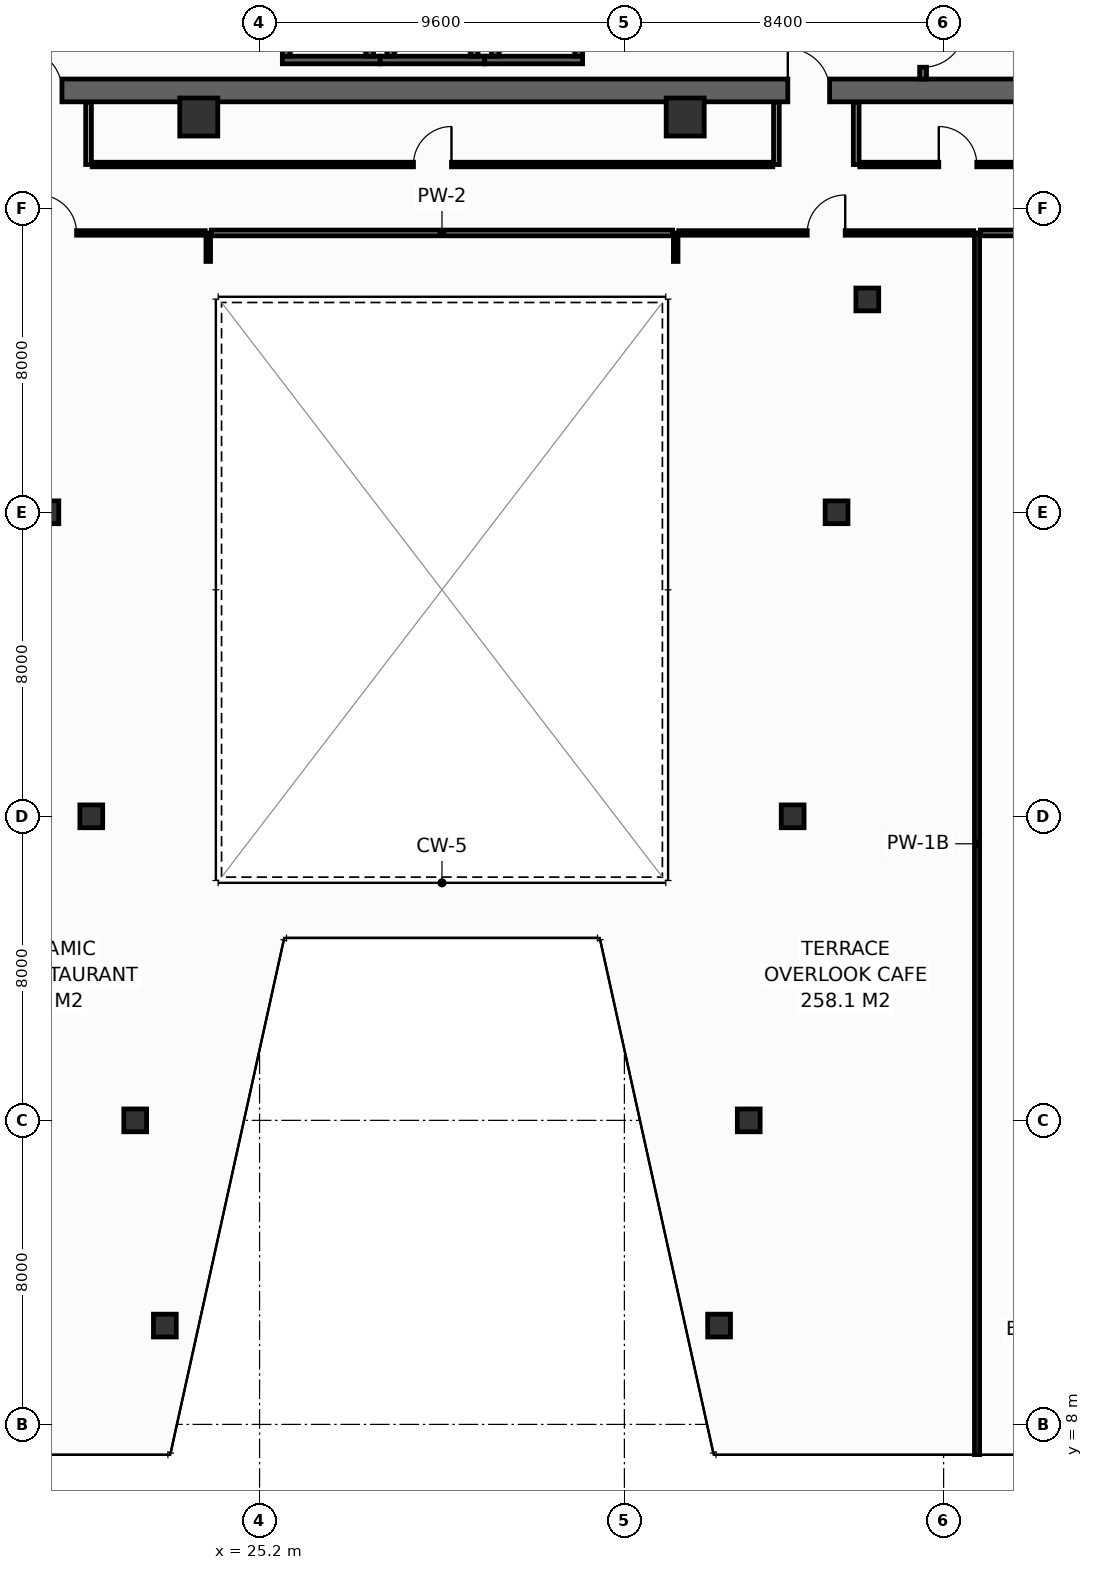
"""IFC4 building model, lengths in metres.
Left out: names, types, materials, properties, quantities, classifications, styles, units other than length and angle.
Written with IfcOpenShell. Run it as: python <this file> out.ifc"""

import sys

from ifc_helpers import new_model, si_unit, direction, frame, frame_2d, origin, origin_2d, place, context, subcontext, project, spatial, rectangle, hollow_rectangle, extrude, element, fill, save


model = new_model("IFC4")
c1 = context("Model", 3, precision=1e-05, world=origin(), true_north=direction((0.0, 1.0)))
c2 = subcontext(c1, "Body", "Model", "MODEL_VIEW")
j1 = project(units=[si_unit("LENGTHUNIT", "METRE"), si_unit("PLANEANGLEUNIT", "RADIAN")], contexts=[c1])
p1 = place(None, origin())
s1 = spatial("IfcSite", under=j1, at=p1, CompositionType="ELEMENT")
p2 = place(p1, origin())
s2 = spatial("IfcBuilding", under=s1, at=p2, CompositionType="ELEMENT")
p3 = place(p2, frame((0.0, 0.0, 106.0)))
s3 = spatial("IfcBuildingStorey", under=s2, at=p3, CompositionType="ELEMENT", Elevation=106.0)
p4 = place(p3, frame((13.5, 43.1, 0.0), z_axis=(0.0, 0.0, 1.0), x_axis=(1.0, 0.0, 0.0)))
e1 = element("IfcWall", 1, at=p4, inside=s3, PredefinedType="SHEAR", context=c2, shape_type="SweptSolid", body=[
    extrude(rectangle(XDim=32.9, YDim=0.6, at=frame_2d((16.45, 0.0))), origin(), (0.0, 0.0, 1.0), 4.15),
])
p5 = place(p4, frame((5.4, 0.0, 0.0)))
e2 = element("IfcOpeningElement", 2, at=p5, cuts=e1, PredefinedType="OPENING", context=c2, shape_type="SweptSolid", body=[
    extrude(rectangle(XDim=1.1, YDim=2.15, at=frame_2d((0.55, 1.075))), frame((0.0, 0.31, 0.0), z_axis=(0.0, -1.0, 0.0), x_axis=(1.0, 0.0, 0.0)), (0.0, 0.0, 1.0), 0.62),
])
p6 = place(p4, frame((25.6, 0.0, 0.0)))
e3 = element("IfcOpeningElement", 3, at=p6, cuts=e1, PredefinedType="OPENING", context=c2, shape_type="SweptSolid", body=[
    extrude(rectangle(XDim=1.1, YDim=2.15, at=frame_2d((0.55, 1.075))), frame((0.0, 0.31, 0.0), z_axis=(0.0, -1.0, 0.0), x_axis=(1.0, 0.0, 0.0)), (0.0, 0.0, 1.0), 0.62),
])
for number, where, z_axis, x_axis in (
    (4, (23.6, 42.4, 0.0), (0.0, 0.0, 1.0), (1.0, 0.0, 0.0)),
    (5, (36.4, 42.4, 0.0), (0.0, 0.0, 1.0), (1.0, 0.0, 0.0)),
):
    element("IfcColumn", number, at=place(p3, frame(where, z_axis=z_axis, x_axis=x_axis)), inside=s3, PredefinedType="COLUMN", context=c2, shape_type="SweptSolid", body=[
        extrude(hollow_rectangle(XDim=1.0, YDim=1.0, WallThickness=0.045, at=origin_2d()), origin(), (0.0, 0.0, 1.0), 4.4),
    ])
for number, where, z_axis, x_axis in (
    (6, (22.708, 10.6, 0.0), (0.0, 0.0, 1.0), (1.0, 0.0, 0.0)),
    (7, (37.292, 10.6, 0.0), (0.0, 0.0, 1.0), (1.0, 0.0, 0.0)),
    (8, (21.928, 16.0, 0.0), (0.0, 0.0, 1.0), (1.0, 0.0, 0.0)),
    (9, (38.072, 16.0, 0.0), (0.0, 0.0, 1.0), (1.0, 0.0, 0.0)),
    (10, (20.772, 24.0, 0.0), (0.0, 0.0, 1.0), (1.0, 0.0, 0.0)),
    (11, (39.228, 24.0, 0.0), (0.0, 0.0, 1.0), (1.0, 0.0, 0.0)),
    (12, (19.617, 32.0, 0.0), (0.0, 0.0, 1.0), (1.0, 0.0, 0.0)),
    (13, (40.383, 32.0, 0.0), (0.0, 0.0, 1.0), (1.0, 0.0, 0.0)),
    (14, (41.192, 37.6, 0.0), (0.0, 0.0, 1.0), (1.0, 0.0, 0.0)),
):
    element("IfcColumn", number, at=place(p3, frame(where, z_axis=z_axis, x_axis=x_axis)), inside=s3, PredefinedType="COLUMN", context=c2, shape_type="SweptSolid", body=[
        extrude(hollow_rectangle(XDim=0.6, YDim=0.6, WallThickness=0.028, at=origin_2d()), origin(), (0.0, 0.0, 1.0), 4.4),
    ])
p7 = place(p3, frame((25.8, 43.9, 0.0), z_axis=(0.0, 0.0, 1.0), x_axis=(1.0, 0.0, 0.0)))
e15 = element("IfcWall", 15, at=p7, inside=s3, PredefinedType="SHEAR", context=c2, shape_type="SweptSolid", body=[
    extrude(rectangle(XDim=2.575, YDim=0.2, at=frame_2d((1.288, 0.0))), origin(), (0.0, 0.0, 1.0), 4.15),
])
for number, where, z_axis, x_axis in (
    (16, (25.9, 44.0, 0.0), (0.0, 0.0, 1.0), (0.0, 1.0, 0.0)),
    (17, (28.1, 44.0, 0.0), (0.0, 0.0, 1.0), (0.0, 1.0, 0.0)),
):
    element("IfcWall", number, at=place(p3, frame(where, z_axis=z_axis, x_axis=x_axis)), inside=s3, PredefinedType="SHEAR", context=c2, shape_type="SweptSolid", body=[
        extrude(rectangle(XDim=2.3, YDim=0.2, at=frame_2d((1.15, 0.0))), origin(), (0.0, 0.0, 1.0), 4.15),
    ])
p8 = place(p3, frame((28.375, 43.9, 0.0), z_axis=(0.0, 0.0, 1.0), x_axis=(1.0, 0.0, 0.0)))
e18 = element("IfcWall", 18, at=p8, inside=s3, PredefinedType="SHEAR", context=c2, shape_type="SweptSolid", body=[
    extrude(rectangle(XDim=2.75, YDim=0.2, at=frame_2d((1.375, 0.0))), origin(), (0.0, 0.0, 1.0), 4.15),
])
for number, where, z_axis, x_axis in (
    (19, (28.65, 44.0, 0.0), (0.0, 0.0, 1.0), (0.0, 1.0, 0.0)),
    (20, (30.85, 44.0, 0.0), (0.0, 0.0, 1.0), (0.0, 1.0, 0.0)),
):
    element("IfcWall", number, at=place(p3, frame(where, z_axis=z_axis, x_axis=x_axis)), inside=s3, PredefinedType="SHEAR", context=c2, shape_type="SweptSolid", body=[
        extrude(rectangle(XDim=2.3, YDim=0.2, at=frame_2d((1.15, 0.0))), origin(), (0.0, 0.0, 1.0), 4.15),
    ])
p9 = place(p3, frame((31.125, 43.9, 0.0), z_axis=(0.0, 0.0, 1.0), x_axis=(1.0, 0.0, 0.0)))
e21 = element("IfcWall", 21, at=p9, inside=s3, PredefinedType="SHEAR", context=c2, shape_type="SweptSolid", body=[
    extrude(rectangle(XDim=2.575, YDim=0.2, at=frame_2d((1.288, 0.0))), origin(), (0.0, 0.0, 1.0), 4.15),
])
for number, where, z_axis, x_axis in (
    (22, (31.4, 44.0, 0.0), (0.0, 0.0, 1.0), (0.0, 1.0, 0.0)),
    (23, (33.6, 44.0, 0.0), (0.0, 0.0, 1.0), (0.0, 1.0, 0.0)),
):
    element("IfcWall", number, at=place(p3, frame(where, z_axis=z_axis, x_axis=x_axis)), inside=s3, PredefinedType="SHEAR", context=c2, shape_type="SweptSolid", body=[
        extrude(rectangle(XDim=2.3, YDim=0.2, at=frame_2d((1.15, 0.0))), origin(), (0.0, 0.0, 1.0), 4.15),
    ])
p10 = place(p3, frame((42.66, 53.8, 0.0), z_axis=(0.0, 0.0, 1.0), x_axis=(0.0, -1.0, 0.0)))
e24 = element("IfcWall", 24, at=p10, inside=s3, PredefinedType="SHEAR", context=c2, shape_type="SweptSolid", body=[
    extrude(rectangle(XDim=10.4, YDim=0.18, at=frame_2d((5.2, 0.0))), origin(), (0.0, 0.0, 1.0), 4.15),
])
p11 = place(p10, frame((8.99, 0.0, 0.0)))
e25 = element("IfcOpeningElement", 25, at=p11, cuts=e24, PredefinedType="OPENING", context=c2, shape_type="SweptSolid", body=[
    extrude(rectangle(XDim=1.1, YDim=2.15, at=frame_2d((0.55, 1.075))), frame((0.0, 0.1, 0.0), z_axis=(0.0, -1.0, 0.0), x_axis=(1.0, 0.0, 0.0)), (0.0, 0.0, 1.0), 0.2),
])
for number, where, z_axis, x_axis in (
    (26, (20.7, 41.15, 0.0), (0.0, 0.0, 1.0), (0.0, 1.0, 0.0)),
    (27, (38.8, 41.15, 0.0), (0.0, 0.0, 1.0), (0.0, 1.0, 0.0)),
    (28, (40.9, 41.15, 0.0), (0.0, 0.0, 1.0), (0.0, 1.0, 0.0)),
):
    element("IfcWall", number, at=place(p3, frame(where, z_axis=z_axis, x_axis=x_axis)), inside=s3, PredefinedType="PARTITIONING", context=c2, shape_type="SweptSolid", body=[
        extrude(rectangle(XDim=1.63, YDim=0.15, at=frame_2d((0.815, 0.0))), origin(), (0.0, 0.0, 1.0), 4.15),
    ])
p12 = place(p3, frame((20.795, 41.15, 0.0), z_axis=(0.0, 0.0, 1.0), x_axis=(1.0, 0.0, 0.0)))
e29 = element("IfcWall", 29, at=p12, inside=s3, PredefinedType="PARTITIONING", context=c2, shape_type="SweptSolid", body=[
    extrude(rectangle(XDim=17.91, YDim=0.12, at=frame_2d((8.955, 0.0))), origin(), (0.0, 0.0, 1.0), 3.335),
])
p13 = place(p12, frame((8.455, 0.0, 0.0)))
e30 = element("IfcOpeningElement", 30, at=p13, cuts=e29, PredefinedType="OPENING", context=c2, shape_type="SweptSolid", body=[
    extrude(rectangle(XDim=1.0, YDim=2.15, at=frame_2d((0.5, 1.075))), frame((0.0, 0.07, 0.0), z_axis=(0.0, -1.0, 0.0), x_axis=(1.0, 0.0, 0.0)), (0.0, 0.0, 1.0), 0.14),
])
p14 = place(p3, frame((40.995, 41.15, 0.0), z_axis=(0.0, 0.0, 1.0), x_axis=(1.0, 0.0, 0.0)))
e31 = element("IfcWall", 31, at=p14, inside=s3, PredefinedType="PARTITIONING", context=c2, shape_type="SweptSolid", body=[
    extrude(rectangle(XDim=5.155, YDim=0.12, at=frame_2d((2.577, 0.0))), origin(), (0.0, 0.0, 1.0), 4.15),
])
p15 = place(p14, frame((2.078, 0.0, 0.0)))
e32 = element("IfcOpeningElement", 32, at=p15, cuts=e31, PredefinedType="OPENING", context=c2, shape_type="SweptSolid", body=[
    extrude(rectangle(XDim=1.0, YDim=2.15, at=frame_2d((0.5, 1.075))), frame((0.0, 0.07, 0.0), z_axis=(0.0, -1.0, 0.0), x_axis=(1.0, 0.0, 0.0)), (0.0, 0.0, 1.0), 0.14),
])
p16 = place(p3, frame((44.08, 7.205, 0.0), z_axis=(0.0, 0.0, 1.0), x_axis=(0.0, 1.0, 0.0)))
e33 = element("IfcWall", 33, at=p16, inside=s3, PredefinedType="PARTITIONING", context=c2, shape_type="SweptSolid", body=[
    extrude(rectangle(XDim=32.145, YDim=0.135, at=frame_2d((16.073, 0.0))), origin(), (0.0, 0.0, 1.0), 3.335),
])
for number, where, z_axis, x_axis in (
    (34, (23.85, 38.6, 0.0), (0.0, 0.0, 1.0), (0.0, 1.0, 0.0)),
    (35, (36.15, 38.6, 0.0), (0.0, 0.0, 1.0), (0.0, 1.0, 0.0)),
):
    element("IfcWall", number, at=place(p3, frame(where, z_axis=z_axis, x_axis=x_axis)), inside=s3, PredefinedType="PARTITIONING", context=c2, shape_type="SweptSolid", body=[
        extrude(rectangle(XDim=0.75, YDim=0.12, at=frame_2d((0.375, 0.0))), origin(), (0.0, 0.0, 1.0), 4.15),
    ])
p17 = place(p3, frame((16.0, 39.35, 0.0), z_axis=(0.0, 0.0, 1.0), x_axis=(1.0, 0.0, 0.0)))
e36 = element("IfcWall", 36, at=p17, inside=s3, PredefinedType="PARTITIONING", context=c2, shape_type="SweptSolid", body=[
    extrude(rectangle(XDim=7.77, YDim=0.12, at=frame_2d((3.885, 0.0))), origin(), (0.0, 0.0, 1.0), 3.335),
])
p18 = place(p17, frame((3.385, 0.0, 0.0)))
e37 = element("IfcOpeningElement", 37, at=p18, cuts=e36, PredefinedType="OPENING", context=c2, shape_type="SweptSolid", body=[
    extrude(rectangle(XDim=1.0, YDim=2.15, at=frame_2d((0.5, 1.075))), frame((0.0, 0.07, 0.0), z_axis=(0.0, -1.0, 0.0), x_axis=(1.0, 0.0, 0.0)), (0.0, 0.0, 1.0), 0.14),
])
p19 = place(p3, frame((23.93, 39.35, 0.0), z_axis=(0.0, 0.0, 1.0), x_axis=(1.0, 0.0, 0.0)))
e38 = element("IfcWall", 38, at=p19, inside=s3, PredefinedType="PARTITIONING", context=c2, shape_type="SweptSolid", body=[
    extrude(rectangle(XDim=12.14, YDim=0.15, at=frame_2d((6.07, 0.0))), origin(), (0.0, 0.0, 1.0), 4.15),
])
p20 = place(p3, frame((36.23, 39.35, 0.0), z_axis=(0.0, 0.0, 1.0), x_axis=(1.0, 0.0, 0.0)))
e39 = element("IfcWall", 39, at=p20, inside=s3, PredefinedType="PARTITIONING", context=c2, shape_type="SweptSolid", body=[
    extrude(rectangle(XDim=7.762, YDim=0.12, at=frame_2d((3.881, 0.0))), origin(), (0.0, 0.0, 1.0), 3.335),
])
p21 = place(p20, frame((3.381, 0.0, 0.0)))
e40 = element("IfcOpeningElement", 40, at=p21, cuts=e39, PredefinedType="OPENING", context=c2, shape_type="SweptSolid", body=[
    extrude(rectangle(XDim=1.0, YDim=2.15, at=frame_2d((0.5, 1.075))), frame((0.0, 0.07, 0.0), z_axis=(0.0, -1.0, 0.0), x_axis=(1.0, 0.0, 0.0)), (0.0, 0.0, 1.0), 0.14),
])
p22 = place(p3, frame((44.167, 39.35, 0.0), z_axis=(0.0, 0.0, 1.0), x_axis=(1.0, 0.0, 0.0)))
e41 = element("IfcWall", 41, at=p22, inside=s3, PredefinedType="PARTITIONING", context=c2, shape_type="SweptSolid", body=[
    extrude(rectangle(XDim=9.528, YDim=0.15, at=frame_2d((4.764, 0.0))), origin(), (0.0, 0.0, 1.0), 3.635),
])
p23 = place(p22, frame((4.239, 0.0, 0.0)))
e42 = element("IfcOpeningElement", 42, at=p23, cuts=e41, PredefinedType="OPENING", context=c2, shape_type="SweptSolid", body=[
    extrude(rectangle(XDim=1.05, YDim=2.15, at=frame_2d((0.525, 1.075))), frame((0.0, 0.085, 0.0), z_axis=(0.0, -1.0, 0.0), x_axis=(1.0, 0.0, 0.0)), (0.0, 0.0, 1.0), 0.17),
])
p24 = place(p11, origin())
e43 = element("IfcDoor", 43, at=p24, inside=s3, OperationType="SINGLE_SWING_LEFT", PredefinedType="DOOR", context=c2, shape_type="SweptSolid", body=[
    extrude(rectangle(XDim=1.1, YDim=2.15, at=frame_2d((0.55, 1.075))), frame((0.0, 0.025, 0.0), z_axis=(0.0, -1.0, 0.0), x_axis=(1.0, 0.0, 0.0)), (0.0, 0.0, 1.0), 0.05),
])
fill(e25, e43)
p25 = place(p5, origin())
e44 = element("IfcDoor", 44, at=p25, inside=s3, OperationType="SINGLE_SWING_LEFT", PredefinedType="DOOR", context=c2, shape_type="SweptSolid", body=[
    extrude(rectangle(XDim=1.1, YDim=2.15, at=frame_2d((0.55, 1.075))), frame((0.0, 0.025, 0.0), z_axis=(0.0, -1.0, 0.0), x_axis=(1.0, 0.0, 0.0)), (0.0, 0.0, 1.0), 0.05),
])
fill(e2, e44)
p26 = place(p6, origin())
e45 = element("IfcDoor", 45, at=p26, inside=s3, OperationType="SINGLE_SWING_LEFT", PredefinedType="DOOR", context=c2, shape_type="SweptSolid", body=[
    extrude(rectangle(XDim=1.1, YDim=2.15, at=frame_2d((0.55, 1.075))), frame((0.0, 0.025, 0.0), z_axis=(0.0, -1.0, 0.0), x_axis=(1.0, 0.0, 0.0)), (0.0, 0.0, 1.0), 0.05),
])
fill(e3, e45)
p27 = place(p13, origin())
e46 = element("IfcDoor", 46, at=p27, inside=s3, OperationType="SINGLE_SWING_RIGHT", PredefinedType="DOOR", context=c2, shape_type="SweptSolid", body=[
    extrude(rectangle(XDim=1.0, YDim=2.15, at=frame_2d((0.5, 1.075))), frame((0.0, 0.025, 0.0), z_axis=(0.0, -1.0, 0.0), x_axis=(1.0, 0.0, 0.0)), (0.0, 0.0, 1.0), 0.05),
])
fill(e30, e46)
p28 = place(p15, origin())
e47 = element("IfcDoor", 47, at=p28, inside=s3, OperationType="SINGLE_SWING_LEFT", PredefinedType="DOOR", context=c2, shape_type="SweptSolid", body=[
    extrude(rectangle(XDim=1.0, YDim=2.15, at=frame_2d((0.5, 1.075))), frame((0.0, 0.025, 0.0), z_axis=(0.0, -1.0, 0.0), x_axis=(1.0, 0.0, 0.0)), (0.0, 0.0, 1.0), 0.05),
])
fill(e32, e47)
p29 = place(p18, origin())
e48 = element("IfcDoor", 48, at=p29, inside=s3, OperationType="SINGLE_SWING_LEFT", PredefinedType="DOOR", context=c2, shape_type="SweptSolid", body=[
    extrude(rectangle(XDim=1.0, YDim=2.15, at=frame_2d((0.5, 1.075))), frame((0.0, 0.025, 0.0), z_axis=(0.0, -1.0, 0.0), x_axis=(1.0, 0.0, 0.0)), (0.0, 0.0, 1.0), 0.05),
])
fill(e37, e48)
p30 = place(p21, origin())
e49 = element("IfcDoor", 49, at=p30, inside=s3, OperationType="SINGLE_SWING_RIGHT", PredefinedType="DOOR", context=c2, shape_type="SweptSolid", body=[
    extrude(rectangle(XDim=1.0, YDim=2.15, at=frame_2d((0.5, 1.075))), frame((0.0, 0.025, 0.0), z_axis=(0.0, -1.0, 0.0), x_axis=(1.0, 0.0, 0.0)), (0.0, 0.0, 1.0), 0.05),
])
fill(e40, e49)
save(model, sys.argv[1])
